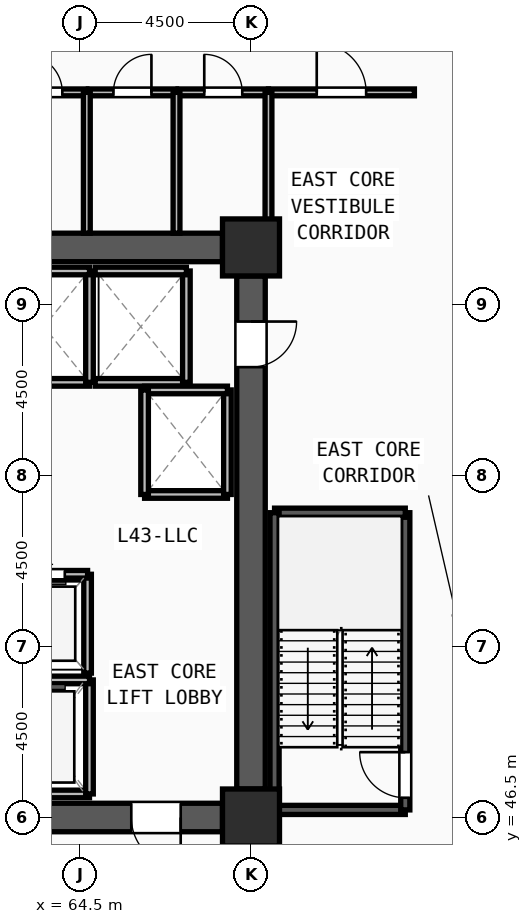
"""IFC4 building model, lengths in metres.
Left out: names, types, materials, properties, quantities, classifications, styles, units other than length and angle.
Written with IfcOpenShell. Run it as: python <this file> out.ifc"""

import sys

from ifc_helpers import new_model, si_unit, direction, frame, frame_2d, origin, origin_2d, place, context, subcontext, project, spatial, rectangle, extrude, source, transform, mapped, element, fill, save


model = new_model("IFC4")
c1 = context("Model", 3, precision=1e-05, world=origin(), true_north=direction((0.0, 1.0)))
c2 = subcontext(c1, "Body", "Model", "MODEL_VIEW")
j1 = project(units=[si_unit("LENGTHUNIT", "METRE"), si_unit("PLANEANGLEUNIT", "RADIAN")], contexts=[c1])
p1 = place(None, origin())
s1 = spatial("IfcSite", under=j1, at=p1, CompositionType="ELEMENT")
p2 = place(p1, origin())
s2 = spatial("IfcBuilding", under=s1, at=p2, CompositionType="ELEMENT")
p3 = place(p2, frame((0.0, 0.0, 166.5)))
s3 = spatial("IfcBuildingStorey", under=s2, at=p3, CompositionType="ELEMENT", Elevation=166.5)
m1 = source(origin(), c2, "Body", "SweptSolid", [
    extrude(rectangle(XDim=1.5, YDim=1.5, at=origin_2d()), origin(), (0.0, 0.0, 1.0), 3.75),
])
for number, where, z_axis, x_axis in (
    (1, (69.0, 46.5, 0.0), (0.0, 0.0, 1.0), (1.0, 0.0, 0.0)),
    (2, (69.0, 61.5, 0.0), (0.0, 0.0, 1.0), (1.0, 0.0, 0.0)),
):
    element("IfcColumn", number, at=place(p3, frame(where, z_axis=z_axis, x_axis=x_axis)), inside=s3, PredefinedType="COLUMN", context=c2, shape_type="MappedRepresentation", body=[
        mapped(m1, transform((0.0, 0.0, 0.0), x_axis=(1.0, 0.0, 0.0), y_axis=(0.0, 1.0, 0.0), z_axis=(0.0, 0.0, 1.0), scale=1.0)),
    ])
p4 = place(p3, frame((60.75, 61.5, 0.0), z_axis=(0.0, 0.0, 1.0), x_axis=(1.0, 0.0, 0.0)))
e3 = element("IfcWall", 3, at=p4, inside=s3, PredefinedType="SHEAR", context=c2, shape_type="SweptSolid", body=[
    extrude(rectangle(XDim=7.5, YDim=0.75, at=frame_2d((3.75, 0.0))), origin(), (0.0, 0.0, 1.0), 3.57),
])
p5 = place(p3, frame((69.0, 60.75, 0.0), z_axis=(0.0, 0.0, 1.0), x_axis=(0.0, -1.0, 0.0)))
e4 = element("IfcWall", 4, at=p5, inside=s3, PredefinedType="SHEAR", context=c2, shape_type="SweptSolid", body=[
    extrude(rectangle(XDim=13.5, YDim=0.75, at=frame_2d((6.75, 0.0))), origin(), (0.0, 0.0, 1.0), 3.57),
])
m2 = source(origin(), c2, "Body", "SweptSolid", [
    extrude(rectangle(XDim=1.2, YDim=2.2, at=frame_2d((0.6, 1.1))), frame((0.0, 0.385, 0.0), z_axis=(0.0, -1.0, 0.0), x_axis=(1.0, 0.0, 0.0)), (0.0, 0.0, 1.0), 0.77),
])
p6 = place(p5, frame((1.2, 0.0, 0.0)))
e5 = element("IfcOpeningElement", 5, at=p6, cuts=e4, PredefinedType="OPENING", context=c2, shape_type="MappedRepresentation", body=[
    mapped(m2, transform((0.0, 0.0, 0.0), x_axis=(1.0, 0.0, 0.0), y_axis=(0.0, 1.0, 0.0), z_axis=(0.0, 0.0, 1.0), scale=1.0)),
])
p7 = place(p3, frame((68.25, 46.5, 0.0), z_axis=(0.0, 0.0, 1.0), x_axis=(-1.0, 0.0, 0.0)))
e6 = element("IfcWall", 6, at=p7, inside=s3, PredefinedType="SHEAR", context=c2, shape_type="SweptSolid", body=[
    extrude(rectangle(XDim=7.5, YDim=0.75, at=frame_2d((3.75, 0.0))), origin(), (0.0, 0.0, 1.0), 3.57),
])
m3 = source(origin(), c2, "Body", "SweptSolid", [
    extrude(rectangle(XDim=1.3, YDim=2.2, at=frame_2d((0.65, 1.1))), frame((0.0, 0.385, 0.0), z_axis=(0.0, -1.0, 0.0), x_axis=(1.0, 0.0, 0.0)), (0.0, 0.0, 1.0), 0.77),
])
p8 = place(p7, frame((1.1, 0.0, 0.0)))
e7 = element("IfcOpeningElement", 7, at=p8, cuts=e6, PredefinedType="OPENING", context=c2, shape_type="MappedRepresentation", body=[
    mapped(m3, transform((0.0, 0.0, 0.0), x_axis=(1.0, 0.0, 0.0), y_axis=(0.0, 1.0, 0.0), z_axis=(0.0, 0.0, 1.0), scale=1.0)),
])
p9 = place(p3, frame((69.62, 46.7, 0.0), z_axis=(0.0, 0.0, 1.0), x_axis=(1.0, 0.0, 0.0)))
e8 = element("IfcWall", 8, at=p9, inside=s3, PredefinedType="SOLIDWALL", context=c2, shape_type="SweptSolid", body=[
    extrude(rectangle(XDim=3.44, YDim=0.24, at=frame_2d((1.72, 0.0))), origin(), (0.0, 0.0, 1.0), 3.57),
])
p10 = place(p3, frame((73.06, 46.7, 0.0), z_axis=(0.0, 0.0, 1.0), x_axis=(0.0, 1.0, 0.0)))
e9 = element("IfcWall", 9, at=p10, inside=s3, PredefinedType="SOLIDWALL", context=c2, shape_type="SweptSolid", body=[
    extrude(rectangle(XDim=7.82, YDim=0.24, at=frame_2d((3.91, 0.0))), origin(), (0.0, 0.0, 1.0), 3.57),
])
m4 = source(origin(), c2, "Body", "SweptSolid", [
    extrude(rectangle(XDim=1.2, YDim=2.2, at=frame_2d((0.6, 1.1))), frame((0.0, 0.13, 0.0), z_axis=(0.0, -1.0, 0.0), x_axis=(1.0, 0.0, 0.0)), (0.0, 0.0, 1.0), 0.26),
])
p11 = place(p10, frame((0.32, 0.0, 0.0)))
e10 = element("IfcOpeningElement", 10, at=p11, cuts=e9, PredefinedType="OPENING", context=c2, shape_type="MappedRepresentation", body=[
    mapped(m4, transform((0.0, 0.0, 0.0), x_axis=(1.0, 0.0, 0.0), y_axis=(0.0, 1.0, 0.0), z_axis=(0.0, 0.0, 1.0), scale=1.0)),
])
p12 = place(p3, frame((73.06, 54.52, 0.0), z_axis=(0.0, 0.0, 1.0), x_axis=(-1.0, 0.0, 0.0)))
e11 = element("IfcWall", 11, at=p12, inside=s3, PredefinedType="SOLIDWALL", context=c2, shape_type="SweptSolid", body=[
    extrude(rectangle(XDim=3.44, YDim=0.24, at=frame_2d((1.72, 0.0))), origin(), (0.0, 0.0, 1.0), 3.57),
])
p13 = place(p3, frame((69.62, 54.52, 0.0), z_axis=(0.0, 0.0, 1.0), x_axis=(0.0, -1.0, 0.0)))
e12 = element("IfcWall", 12, at=p13, inside=s3, PredefinedType="SOLIDWALL", context=c2, shape_type="SweptSolid", body=[
    extrude(rectangle(XDim=7.82, YDim=0.24, at=frame_2d((3.91, 0.0))), origin(), (0.0, 0.0, 1.0), 3.57),
])
p14 = place(p3, frame((62.35, 47.12, 0.0), z_axis=(0.0, 0.0, 1.0), x_axis=(1.0, 0.0, 0.0)))
e13 = element("IfcWall", 13, at=p14, inside=s3, PredefinedType="SOLIDWALL", context=c2, shape_type="SweptSolid", body=[
    extrude(rectangle(XDim=2.4, YDim=0.2, at=frame_2d((1.2, 0.0))), origin(), (0.0, 0.0, 1.0), 3.57),
])
p15 = place(p3, frame((64.75, 47.12, 0.0), z_axis=(0.0, 0.0, 1.0), x_axis=(0.0, 1.0, 0.0)))
e14 = element("IfcWall", 14, at=p15, inside=s3, PredefinedType="SOLIDWALL", context=c2, shape_type="SweptSolid", body=[
    extrude(rectangle(XDim=3.0, YDim=0.2, at=frame_2d((1.5, 0.0))), origin(), (0.0, 0.0, 1.0), 3.57),
])
for number, where, z_axis, x_axis in (
    (15, (64.75, 50.12, 0.0), (0.0, 0.0, 1.0), (-1.0, 0.0, 0.0)),
    (16, (62.35, 57.95, 0.0), (0.0, 0.0, 1.0), (1.0, 0.0, 0.0)),
):
    element("IfcWall", number, at=place(p3, frame(where, z_axis=z_axis, x_axis=x_axis)), inside=s3, PredefinedType="SOLIDWALL", context=c2, shape_type="SweptSolid", body=[
        extrude(rectangle(XDim=2.4, YDim=0.2, at=frame_2d((1.2, 0.0))), origin(), (0.0, 0.0, 1.0), 3.57),
    ])
p16 = place(p3, frame((64.75, 57.95, 0.0), z_axis=(0.0, 0.0, 1.0), x_axis=(0.0, 1.0, 0.0)))
e17 = element("IfcWall", 17, at=p16, inside=s3, PredefinedType="SOLIDWALL", context=c2, shape_type="SweptSolid", body=[
    extrude(rectangle(XDim=2.93, YDim=0.2, at=frame_2d((1.465, 0.0))), origin(), (0.0, 0.0, 1.0), 3.57),
])
p17 = place(p3, frame((64.75, 60.88, 0.0), z_axis=(0.0, 0.0, 1.0), x_axis=(-1.0, 0.0, 0.0)))
e18 = element("IfcWall", 18, at=p17, inside=s3, PredefinedType="SOLIDWALL", context=c2, shape_type="SweptSolid", body=[
    extrude(rectangle(XDim=2.4, YDim=0.2, at=frame_2d((1.2, 0.0))), origin(), (0.0, 0.0, 1.0), 3.57),
])
p18 = place(p3, frame((64.9, 57.95, 0.0), z_axis=(0.0, 0.0, 1.0), x_axis=(1.0, 0.0, 0.0)))
e19 = element("IfcWall", 19, at=p18, inside=s3, PredefinedType="SOLIDWALL", context=c2, shape_type="SweptSolid", body=[
    extrude(rectangle(XDim=2.4, YDim=0.2, at=frame_2d((1.2, 0.0))), origin(), (0.0, 0.0, 1.0), 3.57),
])
p19 = place(p3, frame((67.3, 57.95, 0.0), z_axis=(0.0, 0.0, 1.0), x_axis=(0.0, 1.0, 0.0)))
e20 = element("IfcWall", 20, at=p19, inside=s3, PredefinedType="SOLIDWALL", context=c2, shape_type="SweptSolid", body=[
    extrude(rectangle(XDim=2.93, YDim=0.2, at=frame_2d((1.465, 0.0))), origin(), (0.0, 0.0, 1.0), 3.57),
])
p20 = place(p3, frame((67.3, 60.88, 0.0), z_axis=(0.0, 0.0, 1.0), x_axis=(-1.0, 0.0, 0.0)))
e21 = element("IfcWall", 21, at=p20, inside=s3, PredefinedType="SOLIDWALL", context=c2, shape_type="SweptSolid", body=[
    extrude(rectangle(XDim=2.4, YDim=0.2, at=frame_2d((1.2, 0.0))), origin(), (0.0, 0.0, 1.0), 3.57),
])
p21 = place(p3, frame((66.2, 55.0, 0.0), z_axis=(0.0, 0.0, 1.0), x_axis=(1.0, 0.0, 0.0)))
e22 = element("IfcWall", 22, at=p21, inside=s3, PredefinedType="SOLIDWALL", context=c2, shape_type="SweptSolid", body=[
    extrude(rectangle(XDim=2.18, YDim=0.2, at=frame_2d((1.09, 0.0))), origin(), (0.0, 0.0, 1.0), 3.57),
])
p22 = place(p3, frame((68.38, 55.0, 0.0), z_axis=(0.0, 0.0, 1.0), x_axis=(0.0, 1.0, 0.0)))
e23 = element("IfcWall", 23, at=p22, inside=s3, PredefinedType="SOLIDWALL", context=c2, shape_type="SweptSolid", body=[
    extrude(rectangle(XDim=2.75, YDim=0.2, at=frame_2d((1.375, 0.0))), origin(), (0.0, 0.0, 1.0), 3.57),
])
p23 = place(p3, frame((68.38, 57.75, 0.0), z_axis=(0.0, 0.0, 1.0), x_axis=(-1.0, 0.0, 0.0)))
e24 = element("IfcWall", 24, at=p23, inside=s3, PredefinedType="SOLIDWALL", context=c2, shape_type="SweptSolid", body=[
    extrude(rectangle(XDim=2.18, YDim=0.2, at=frame_2d((1.09, 0.0))), origin(), (0.0, 0.0, 1.0), 3.57),
])
p24 = place(p3, frame((66.2, 57.75, 0.0), z_axis=(0.0, 0.0, 1.0), x_axis=(0.0, -1.0, 0.0)))
e25 = element("IfcWall", 25, at=p24, inside=s3, PredefinedType="SOLIDWALL", context=c2, shape_type="SweptSolid", body=[
    extrude(rectangle(XDim=2.75, YDim=0.2, at=frame_2d((1.375, 0.0))), origin(), (0.0, 0.0, 1.0), 3.57),
])
p25 = place(p3, frame((64.7, 50.3, 0.0), z_axis=(0.0, 0.0, 1.0), x_axis=(0.0, 1.0, 0.0)))
e26 = element("IfcWall", 26, at=p25, inside=s3, PredefinedType="SOLIDWALL", context=c2, shape_type="SweptSolid", body=[
    extrude(rectangle(XDim=2.6, YDim=0.2, at=frame_2d((1.3, 0.0))), origin(), (0.0, 0.0, 1.0), 3.57),
])
p26 = place(p3, frame((64.7, 52.9, 0.0), z_axis=(0.0, 0.0, 1.0), x_axis=(-1.0, 0.0, 0.0)))
e27 = element("IfcWall", 27, at=p26, inside=s3, PredefinedType="SOLIDWALL", context=c2, shape_type="SweptSolid", body=[
    extrude(rectangle(XDim=2.3, YDim=0.2, at=frame_2d((1.15, 0.0))), origin(), (0.0, 0.0, 1.0), 3.57),
])
m5 = source(origin(), c2, "Body", "SweptSolid", [
    extrude(rectangle(XDim=1.1, YDim=2.2, at=frame_2d((0.55, 1.1))), frame((0.0, 0.11, 0.0), z_axis=(0.0, -1.0, 0.0), x_axis=(1.0, 0.0, 0.0)), (0.0, 0.0, 1.0), 0.22),
])
p27 = place(p26, frame((0.6, 0.0, 0.0)))
e28 = element("IfcOpeningElement", 28, at=p27, cuts=e27, PredefinedType="OPENING", context=c2, shape_type="MappedRepresentation", body=[
    mapped(m5, transform((0.0, 0.0, 0.0), x_axis=(1.0, 0.0, 0.0), y_axis=(0.0, 1.0, 0.0), z_axis=(0.0, 0.0, 1.0), scale=1.0)),
])
p28 = place(p3, frame((62.39, 65.58, 0.0), z_axis=(0.0, 0.0, 1.0), x_axis=(1.0, 0.0, 0.0)))
e29 = element("IfcWall", 29, at=p28, inside=s3, PredefinedType="PARTITIONING", context=c2, shape_type="SweptSolid", body=[
    extrude(rectangle(XDim=2.29, YDim=0.18, at=frame_2d((1.145, 0.0))), origin(), (0.0, 0.0, 1.0), 3.57),
])
m6 = source(origin(), c2, "Body", "SweptSolid", [
    extrude(rectangle(XDim=1.0, YDim=2.2, at=frame_2d((0.5, 1.1))), frame((0.0, 0.1, 0.0), z_axis=(0.0, -1.0, 0.0), x_axis=(1.0, 0.0, 0.0)), (0.0, 0.0, 1.0), 0.2),
])
p29 = place(p28, frame((0.645, 0.0, 0.0)))
e30 = element("IfcOpeningElement", 30, at=p29, cuts=e29, PredefinedType="OPENING", context=c2, shape_type="MappedRepresentation", body=[
    mapped(m6, transform((0.0, 0.0, 0.0), x_axis=(1.0, 0.0, 0.0), y_axis=(0.0, 1.0, 0.0), z_axis=(0.0, 0.0, 1.0), scale=1.0)),
])
p30 = place(p3, frame((64.72, 65.58, 0.0), z_axis=(0.0, 0.0, 1.0), x_axis=(1.0, 0.0, 0.0)))
e31 = element("IfcWall", 31, at=p30, inside=s3, PredefinedType="PARTITIONING", context=c2, shape_type="SweptSolid", body=[
    extrude(rectangle(XDim=2.32, YDim=0.18, at=frame_2d((1.16, 0.0))), origin(), (0.0, 0.0, 1.0), 3.57),
])
p31 = place(p30, frame((0.66, 0.0, 0.0)))
e32 = element("IfcOpeningElement", 32, at=p31, cuts=e31, PredefinedType="OPENING", context=c2, shape_type="MappedRepresentation", body=[
    mapped(m6, transform((0.0, 0.0, 0.0), x_axis=(1.0, 0.0, 0.0), y_axis=(0.0, 1.0, 0.0), z_axis=(0.0, 0.0, 1.0), scale=1.0)),
])
p32 = place(p3, frame((67.08, 65.58, 0.0), z_axis=(0.0, 0.0, 1.0), x_axis=(1.0, 0.0, 0.0)))
e33 = element("IfcWall", 33, at=p32, inside=s3, PredefinedType="PARTITIONING", context=c2, shape_type="SweptSolid", body=[
    extrude(rectangle(XDim=2.38, YDim=0.18, at=frame_2d((1.19, 0.0))), origin(), (0.0, 0.0, 1.0), 3.57),
])
p33 = place(p32, frame((0.69, 0.0, 0.0)))
e34 = element("IfcOpeningElement", 34, at=p33, cuts=e33, PredefinedType="OPENING", context=c2, shape_type="MappedRepresentation", body=[
    mapped(m6, transform((0.0, 0.0, 0.0), x_axis=(1.0, 0.0, 0.0), y_axis=(0.0, 1.0, 0.0), z_axis=(0.0, 0.0, 1.0), scale=1.0)),
])
p34 = place(p3, frame((69.46, 65.58, 0.0), z_axis=(0.0, 0.0, 1.0), x_axis=(1.0, 0.0, 0.0)))
e35 = element("IfcWall", 35, at=p34, inside=s3, PredefinedType="PARTITIONING", context=c2, shape_type="SweptSolid", body=[
    extrude(rectangle(XDim=3.84, YDim=0.18, at=frame_2d((1.92, 0.0))), origin(), (0.0, 0.0, 1.0), 3.57),
])
m7 = source(origin(), c2, "Body", "SweptSolid", [
    extrude(rectangle(XDim=1.3, YDim=2.2, at=frame_2d((0.65, 1.1))), frame((0.0, 0.1, 0.0), z_axis=(0.0, -1.0, 0.0), x_axis=(1.0, 0.0, 0.0)), (0.0, 0.0, 1.0), 0.2),
])
p35 = place(p34, frame((1.27, 0.0, 0.0)))
e36 = element("IfcOpeningElement", 36, at=p35, cuts=e35, PredefinedType="OPENING", context=c2, shape_type="MappedRepresentation", body=[
    mapped(m7, transform((0.0, 0.0, 0.0), x_axis=(1.0, 0.0, 0.0), y_axis=(0.0, 1.0, 0.0), z_axis=(0.0, 0.0, 1.0), scale=1.0)),
])
for number, where, z_axis, x_axis in (
    (37, (64.68, 61.875, 0.0), (0.0, 0.0, 1.0), (0.0, 1.0, 0.0)),
    (38, (67.04, 61.875, 0.0), (0.0, 0.0, 1.0), (0.0, 1.0, 0.0)),
):
    element("IfcWall", number, at=place(p3, frame(where, z_axis=z_axis, x_axis=x_axis)), inside=s3, PredefinedType="PARTITIONING", context=c2, shape_type="SweptSolid", body=[
        extrude(rectangle(XDim=3.705, YDim=0.18, at=frame_2d((1.853, 0.0))), origin(), (0.0, 0.0, 1.0), 3.57),
    ])
p36 = place(p3, frame((69.46, 61.95, 0.0), z_axis=(0.0, 0.0, 1.0), x_axis=(0.0, 1.0, 0.0)))
e39 = element("IfcWall", 39, at=p36, inside=s3, PredefinedType="PARTITIONING", context=c2, shape_type="SweptSolid", body=[
    extrude(rectangle(XDim=3.63, YDim=0.18, at=frame_2d((1.815, 0.0))), origin(), (0.0, 0.0, 1.0), 3.57),
])
m8 = source(origin(), c2, "Body", "SweptSolid", [
    extrude(rectangle(XDim=1.3, YDim=2.2, at=frame_2d((0.65, 1.1))), frame((0.0, 0.025, 0.0), z_axis=(0.0, -1.0, 0.0), x_axis=(1.0, 0.0, 0.0)), (0.0, 0.0, 1.0), 0.05),
])
p37 = place(p8, origin())
e40 = element("IfcDoor", 40, at=p37, inside=s3, OperationType="SINGLE_SWING_LEFT", PredefinedType="DOOR", context=c2, shape_type="MappedRepresentation", body=[
    mapped(m8, transform((0.0, 0.0, 0.0), x_axis=(1.0, 0.0, 0.0), y_axis=(0.0, 1.0, 0.0), z_axis=(0.0, 0.0, 1.0), scale=1.0)),
])
fill(e7, e40)
m9 = source(origin(), c2, "Body", "SweptSolid", [
    extrude(rectangle(XDim=1.2, YDim=2.2, at=frame_2d((0.6, 1.1))), frame((0.0, 0.025, 0.0), z_axis=(0.0, -1.0, 0.0), x_axis=(1.0, 0.0, 0.0)), (0.0, 0.0, 1.0), 0.05),
])
p38 = place(p6, origin())
e41 = element("IfcDoor", 41, at=p38, inside=s3, OperationType="SINGLE_SWING_LEFT", PredefinedType="DOOR", context=c2, shape_type="MappedRepresentation", body=[
    mapped(m9, transform((0.0, 0.0, 0.0), x_axis=(1.0, 0.0, 0.0), y_axis=(0.0, 1.0, 0.0), z_axis=(0.0, 0.0, 1.0), scale=1.0)),
])
fill(e5, e41)
p39 = place(p11, origin())
e42 = element("IfcDoor", 42, at=p39, inside=s3, OperationType="SINGLE_SWING_RIGHT", PredefinedType="DOOR", context=c2, shape_type="MappedRepresentation", body=[
    mapped(m9, transform((0.0, 0.0, 0.0), x_axis=(1.0, 0.0, 0.0), y_axis=(0.0, 1.0, 0.0), z_axis=(0.0, 0.0, 1.0), scale=1.0)),
])
fill(e10, e42)
m10 = source(origin(), c2, "Body", "SweptSolid", [
    extrude(rectangle(XDim=1.1, YDim=2.2, at=frame_2d((0.55, 1.1))), frame((0.0, 0.025, 0.0), z_axis=(0.0, -1.0, 0.0), x_axis=(1.0, 0.0, 0.0)), (0.0, 0.0, 1.0), 0.05),
])
p40 = place(p27, origin())
e43 = element("IfcDoor", 43, at=p40, inside=s3, OperationType="SLIDING_TO_LEFT", PredefinedType="DOOR", context=c2, shape_type="MappedRepresentation", body=[
    mapped(m10, transform((0.0, 0.0, 0.0), x_axis=(1.0, 0.0, 0.0), y_axis=(0.0, 1.0, 0.0), z_axis=(0.0, 0.0, 1.0), scale=1.0)),
])
fill(e28, e43)
m11 = source(origin(), c2, "Body", "SweptSolid", [
    extrude(rectangle(XDim=1.0, YDim=2.2, at=frame_2d((0.5, 1.1))), frame((0.0, 0.025, 0.0), z_axis=(0.0, -1.0, 0.0), x_axis=(1.0, 0.0, 0.0)), (0.0, 0.0, 1.0), 0.05),
])
p41 = place(p29, origin())
e44 = element("IfcDoor", 44, at=p41, inside=s3, OperationType="SINGLE_SWING_LEFT", PredefinedType="DOOR", context=c2, shape_type="MappedRepresentation", body=[
    mapped(m11, transform((0.0, 0.0, 0.0), x_axis=(1.0, 0.0, 0.0), y_axis=(0.0, 1.0, 0.0), z_axis=(0.0, 0.0, 1.0), scale=1.0)),
])
fill(e30, e44)
p42 = place(p31, origin())
e45 = element("IfcDoor", 45, at=p42, inside=s3, OperationType="SINGLE_SWING_RIGHT", PredefinedType="DOOR", context=c2, shape_type="MappedRepresentation", body=[
    mapped(m11, transform((0.0, 0.0, 0.0), x_axis=(1.0, 0.0, 0.0), y_axis=(0.0, 1.0, 0.0), z_axis=(0.0, 0.0, 1.0), scale=1.0)),
])
fill(e32, e45)
p43 = place(p33, origin())
e46 = element("IfcDoor", 46, at=p43, inside=s3, OperationType="SINGLE_SWING_LEFT", PredefinedType="DOOR", context=c2, shape_type="MappedRepresentation", body=[
    mapped(m11, transform((0.0, 0.0, 0.0), x_axis=(1.0, 0.0, 0.0), y_axis=(0.0, 1.0, 0.0), z_axis=(0.0, 0.0, 1.0), scale=1.0)),
])
fill(e34, e46)
p44 = place(p35, origin())
e47 = element("IfcDoor", 47, at=p44, inside=s3, OperationType="SINGLE_SWING_LEFT", PredefinedType="DOOR", context=c2, shape_type="MappedRepresentation", body=[
    mapped(m8, transform((0.0, 0.0, 0.0), x_axis=(1.0, 0.0, 0.0), y_axis=(0.0, 1.0, 0.0), z_axis=(0.0, 0.0, 1.0), scale=1.0)),
])
fill(e36, e47)
save(model, sys.argv[1])
